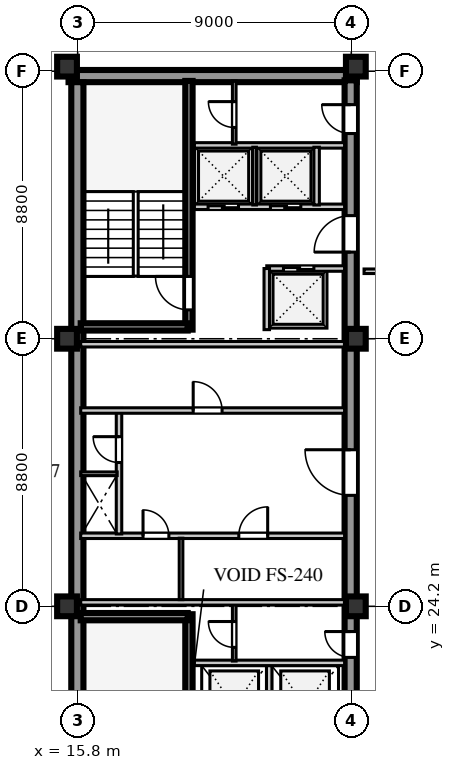
"""IFC4 building model, lengths in metres.
Left out: names, types, materials, properties, quantities, classifications, styles, units other than length and angle.
Written with IfcOpenShell. Run it as: python <this file> out.ifc"""

import sys

from ifc_helpers import new_model, si_unit, direction, frame, frame_2d, origin, origin_2d, place, context, subcontext, project, spatial, rectangle, extrude, element, fill, save


model = new_model("IFC4")
c1 = context("Model", 3, precision=1e-05, world=origin(), true_north=direction((0.0, 1.0)))
c2 = subcontext(c1, "Body", "Model", "MODEL_VIEW")
j1 = project(units=[si_unit("LENGTHUNIT", "METRE"), si_unit("PLANEANGLEUNIT", "RADIAN")], contexts=[c1])
p1 = place(None, origin())
s1 = spatial("IfcSite", under=j1, at=p1, CompositionType="ELEMENT")
p2 = place(p1, origin())
s2 = spatial("IfcBuilding", under=s1, at=p2, CompositionType="ELEMENT")
p3 = place(p2, frame((0.0, 0.0, 312.5)))
s3 = spatial("IfcBuildingStorey", under=s2, at=p3, CompositionType="ELEMENT", Elevation=312.5)
p4 = place(p3, frame((15.5, 41.64, 0.0), z_axis=(0.0, 0.0, 1.0), x_axis=(1.0, 0.0, 0.0)))
e1 = element("IfcWall", 1, at=p4, inside=s3, PredefinedType="SHEAR", context=c2, shape_type="SweptSolid", body=[
    extrude(rectangle(XDim=9.48, YDim=0.4, at=frame_2d((4.74, 0.0))), origin(), (0.0, 0.0, 1.0), 3.56),
])
p5 = place(p3, frame((15.79, 15.81, 0.0), z_axis=(0.0, 0.0, 1.0), x_axis=(0.0, 1.0, 0.0)))
e2 = element("IfcWall", 2, at=p5, inside=s3, PredefinedType="SHEAR", context=c2, shape_type="SweptSolid", body=[
    extrude(rectangle(XDim=25.63, YDim=0.4, at=frame_2d((12.815, 0.0))), origin(), (0.0, 0.0, 1.0), 3.56),
])
p6 = place(p3, frame((24.78, 15.74, 0.0), z_axis=(0.0, 0.0, 1.0), x_axis=(0.0, 1.0, 0.0)))
e3 = element("IfcWall", 3, at=p6, inside=s3, PredefinedType="SHEAR", context=c2, shape_type="SweptSolid", body=[
    extrude(rectangle(XDim=25.76, YDim=0.4, at=frame_2d((12.88, 0.0))), origin(), (0.0, 0.0, 1.0), 3.56),
])
p7 = place(p6, frame((1.61, 0.0, 0.0)))
e4 = element("IfcOpeningElement", 4, at=p7, cuts=e3, PredefinedType="OPENING", context=c2, shape_type="SweptSolid", body=[
    extrude(rectangle(XDim=1.2, YDim=2.1, at=frame_2d((0.6, 1.05))), frame((0.0, 0.21, 0.0), z_axis=(0.0, -1.0, 0.0), x_axis=(1.0, 0.0, 0.0)), (0.0, 0.0, 1.0), 0.42),
])
p8 = place(p6, frame((6.78, 0.0, 0.0)))
e5 = element("IfcOpeningElement", 5, at=p8, cuts=e3, PredefinedType="OPENING", context=c2, shape_type="SweptSolid", body=[
    extrude(rectangle(XDim=0.85, YDim=2.06, at=frame_2d((0.425, 1.03))), frame((0.0, 0.21, 0.0), z_axis=(0.0, -1.0, 0.0), x_axis=(1.0, 0.0, 0.0)), (0.0, 0.0, 1.0), 0.42),
])
p9 = place(p6, frame((12.11, 0.0, 0.0)))
e6 = element("IfcOpeningElement", 6, at=p9, cuts=e3, PredefinedType="OPENING", context=c2, shape_type="SweptSolid", body=[
    extrude(rectangle(XDim=1.5, YDim=2.12, at=frame_2d((0.75, 1.06))), frame((0.0, 0.21, 0.0), z_axis=(0.0, -1.0, 0.0), x_axis=(1.0, 0.0, 0.0)), (0.0, 0.0, 1.0), 0.42),
])
p10 = place(p6, frame((20.11, 0.0, 0.0)))
e7 = element("IfcOpeningElement", 7, at=p10, cuts=e3, PredefinedType="OPENING", context=c2, shape_type="SweptSolid", body=[
    extrude(rectangle(XDim=1.2, YDim=2.12, at=frame_2d((0.6, 1.06))), frame((0.0, 0.21, 0.0), z_axis=(0.0, -1.0, 0.0), x_axis=(1.0, 0.0, 0.0)), (0.0, 0.0, 1.0), 0.42),
])
p11 = place(p6, frame((24.01, 0.0, 0.0)))
e8 = element("IfcOpeningElement", 8, at=p11, cuts=e3, PredefinedType="OPENING", context=c2, shape_type="SweptSolid", body=[
    extrude(rectangle(XDim=0.95, YDim=2.1, at=frame_2d((0.475, 1.05))), frame((0.0, 0.21, 0.0), z_axis=(0.0, -1.0, 0.0), x_axis=(1.0, 0.0, 0.0)), (0.0, 0.0, 1.0), 0.42),
])
for number, where, z_axis, x_axis in (
    (9, (15.45, 24.2, 0.0), (0.0, 0.0, 1.0), (1.0, 0.0, 0.0)),
    (10, (15.45, 33.0, 0.0), (0.0, 0.0, 1.0), (1.0, 0.0, 0.0)),
    (11, (15.45, 41.95, 0.0), (0.0, 0.0, 1.0), (1.0, 0.0, 0.0)),
    (12, (24.95, 24.2, 0.0), (0.0, 0.0, 1.0), (1.0, 0.0, 0.0)),
    (13, (24.95, 33.0, 0.0), (0.0, 0.0, 1.0), (1.0, 0.0, 0.0)),
    (14, (24.95, 41.95, 0.0), (0.0, 0.0, 1.0), (1.0, 0.0, 0.0)),
):
    element("IfcColumn", number, at=place(p3, frame(where, z_axis=z_axis, x_axis=x_axis)), inside=s3, PredefinedType="COLUMN", context=c2, shape_type="SweptSolid", body=[
        extrude(rectangle(XDim=0.65, YDim=0.65, at=origin_2d()), origin(), (0.0, 0.0, 1.0), 3.56),
    ])
p12 = place(p3, frame((19.46, 15.74, 0.0), z_axis=(0.0, 0.0, 1.0), x_axis=(0.0, 1.0, 0.0)))
e15 = element("IfcWall", 15, at=p12, inside=s3, PredefinedType="SHEAR", context=c2, shape_type="SweptSolid", body=[
    extrude(rectangle(XDim=8.2, YDim=0.24, at=frame_2d((4.1, 0.0))), origin(), (0.0, 0.0, 1.0), 3.8),
])
p13 = place(p12, frame((0.45, 0.0, 0.0)))
e16 = element("IfcOpeningElement", 16, at=p13, cuts=e15, PredefinedType="OPENING", context=c2, shape_type="SweptSolid", body=[
    extrude(rectangle(XDim=1.1, YDim=2.1, at=frame_2d((0.55, 1.05))), frame((0.0, 0.13, 0.0), z_axis=(0.0, -1.0, 0.0), x_axis=(1.0, 0.0, 0.0)), (0.0, 0.0, 1.0), 0.26),
])
p14 = place(p3, frame((15.9, 23.86, 0.0), z_axis=(0.0, 0.0, 1.0), x_axis=(1.0, 0.0, 0.0)))
e17 = element("IfcWall", 17, at=p14, inside=s3, PredefinedType="SHEAR", context=c2, shape_type="SweptSolid", body=[
    extrude(rectangle(XDim=3.52, YDim=0.24, at=frame_2d((1.76, 0.0))), origin(), (0.0, 0.0, 1.0), 3.8),
])
p15 = place(p3, frame((22.1, 19.51, 0.0), z_axis=(0.0, 0.0, 1.0), x_axis=(0.0, 1.0, 0.0)))
e18 = element("IfcWall", 18, at=p15, inside=s3, PredefinedType="SOLIDWALL", context=c2, shape_type="SweptSolid", body=[
    extrude(rectangle(XDim=2.74, YDim=0.18, at=frame_2d((1.37, 0.0))), origin(), (0.0, 0.0, 1.0), 3.56),
])
p16 = place(p3, frame((19.64, 22.34, 0.0), z_axis=(0.0, 0.0, 1.0), x_axis=(1.0, 0.0, 0.0)))
e19 = element("IfcWall", 19, at=p16, inside=s3, PredefinedType="SOLIDWALL", context=c2, shape_type="SweptSolid", body=[
    extrude(rectangle(XDim=4.94, YDim=0.18, at=frame_2d((2.47, 0.0))), origin(), (0.0, 0.0, 1.0), 3.56),
])
p17 = place(p3, frame((20.95, 22.4, 0.0), z_axis=(0.0, 0.0, 1.0), x_axis=(0.0, 1.0, 0.0)))
e20 = element("IfcWall", 20, at=p17, inside=s3, PredefinedType="PARTITIONING", context=c2, shape_type="SweptSolid", body=[
    extrude(rectangle(XDim=1.88, YDim=0.12, at=frame_2d((0.94, 0.0))), origin(), (0.0, 0.0, 1.0), 3.56),
])
p18 = place(p17, frame((0.45, 0.0, 0.0)))
e21 = element("IfcOpeningElement", 21, at=p18, cuts=e20, PredefinedType="OPENING", context=c2, shape_type="SweptSolid", body=[
    extrude(rectangle(XDim=0.85, YDim=2.06, at=frame_2d((0.425, 1.03))), frame((0.0, 0.07, 0.0), z_axis=(0.0, -1.0, 0.0), x_axis=(1.0, 0.0, 0.0)), (0.0, 0.0, 1.0), 0.14),
])
p19 = place(p3, frame((15.9, 26.52, 0.0), z_axis=(0.0, 0.0, 1.0), x_axis=(1.0, 0.0, 0.0)))
e22 = element("IfcWall", 22, at=p19, inside=s3, PredefinedType="SOLIDWALL", context=c2, shape_type="SweptSolid", body=[
    extrude(rectangle(XDim=8.68, YDim=0.18, at=frame_2d((4.34, 0.0))), origin(), (0.0, 0.0, 1.0), 3.56),
])
p20 = place(p19, frame((2.05, 0.0, 0.0)))
e23 = element("IfcOpeningElement", 23, at=p20, cuts=e22, PredefinedType="OPENING", context=c2, shape_type="SweptSolid", body=[
    extrude(rectangle(XDim=0.85, YDim=2.06, at=frame_2d((0.425, 1.03))), frame((0.0, 0.1, 0.0), z_axis=(0.0, -1.0, 0.0), x_axis=(1.0, 0.0, 0.0)), (0.0, 0.0, 1.0), 0.2),
])
p21 = place(p19, frame((5.2, 0.0, 0.0)))
e24 = element("IfcOpeningElement", 24, at=p21, cuts=e22, PredefinedType="OPENING", context=c2, shape_type="SweptSolid", body=[
    extrude(rectangle(XDim=0.95, YDim=2.1, at=frame_2d((0.475, 1.05))), frame((0.0, 0.1, 0.0), z_axis=(0.0, -1.0, 0.0), x_axis=(1.0, 0.0, 0.0)), (0.0, 0.0, 1.0), 0.2),
])
p22 = place(p3, frame((15.9, 24.33, 0.0), z_axis=(0.0, 0.0, 1.0), x_axis=(1.0, 0.0, 0.0)))
e25 = element("IfcWall", 25, at=p22, inside=s3, PredefinedType="SOLIDWALL", context=c2, shape_type="SweptSolid", body=[
    extrude(rectangle(XDim=8.68, YDim=0.18, at=frame_2d((4.34, 0.0))), origin(), (0.0, 0.0, 1.0), 2.96),
])
p23 = place(p3, frame((19.2, 24.42, 0.0), z_axis=(0.0, 0.0, 1.0), x_axis=(0.0, 1.0, 0.0)))
e26 = element("IfcWall", 26, at=p23, inside=s3, PredefinedType="PARTITIONING", context=c2, shape_type="SweptSolid", body=[
    extrude(rectangle(XDim=2.02, YDim=0.12, at=frame_2d((1.01, 0.0))), origin(), (0.0, 0.0, 1.0), 3.56),
])
p24 = place(p3, frame((17.16, 26.58, 0.0), z_axis=(0.0, 0.0, 1.0), x_axis=(0.0, 1.0, 0.0)))
e27 = element("IfcWall", 27, at=p24, inside=s3, PredefinedType="SOLIDWALL", context=c2, shape_type="SweptSolid", body=[
    extrude(rectangle(XDim=4.02, YDim=0.18, at=frame_2d((2.01, 0.0))), origin(), (0.0, 0.0, 1.0), 3.56),
])
p25 = place(p24, frame((2.35, 0.0, 0.0)))
e28 = element("IfcOpeningElement", 28, at=p25, cuts=e27, PredefinedType="OPENING", context=c2, shape_type="SweptSolid", body=[
    extrude(rectangle(XDim=0.85, YDim=2.06, at=frame_2d((0.425, 1.03))), frame((0.0, 0.1, 0.0), z_axis=(0.0, -1.0, 0.0), x_axis=(1.0, 0.0, 0.0)), (0.0, 0.0, 1.0), 0.2),
])
p26 = place(p3, frame((15.9, 28.56, 0.0), z_axis=(0.0, 0.0, 1.0), x_axis=(1.0, 0.0, 0.0)))
e29 = element("IfcWall", 29, at=p26, inside=s3, PredefinedType="PARTITIONING", context=c2, shape_type="SweptSolid", body=[
    extrude(rectangle(XDim=1.2, YDim=0.12, at=frame_2d((0.6, 0.0))), origin(), (0.0, 0.0, 1.0), 3.56),
])
p27 = place(p3, frame((15.9, 30.64, 0.0), z_axis=(0.0, 0.0, 1.0), x_axis=(1.0, 0.0, 0.0)))
e30 = element("IfcWall", 30, at=p27, inside=s3, PredefinedType="SOLIDWALL", context=c2, shape_type="SweptSolid", body=[
    extrude(rectangle(XDim=8.68, YDim=0.18, at=frame_2d((4.34, 0.0))), origin(), (0.0, 0.0, 1.0), 3.56),
])
p28 = place(p27, frame((3.7, 0.0, 0.0)))
e31 = element("IfcOpeningElement", 31, at=p28, cuts=e30, PredefinedType="OPENING", context=c2, shape_type="SweptSolid", body=[
    extrude(rectangle(XDim=0.95, YDim=2.1, at=frame_2d((0.475, 1.05))), frame((0.0, 0.1, 0.0), z_axis=(0.0, -1.0, 0.0), x_axis=(1.0, 0.0, 0.0)), (0.0, 0.0, 1.0), 0.2),
])
p29 = place(p3, frame((15.9, 32.82, 0.0), z_axis=(0.0, 0.0, 1.0), x_axis=(1.0, 0.0, 0.0)))
e32 = element("IfcWall", 32, at=p29, inside=s3, PredefinedType="SOLIDWALL", context=c2, shape_type="SweptSolid", body=[
    extrude(rectangle(XDim=8.68, YDim=0.18, at=frame_2d((4.34, 0.0))), origin(), (0.0, 0.0, 1.0), 2.96),
])
p30 = place(p3, frame((19.46, 33.3, 0.0), z_axis=(0.0, 0.0, 1.0), x_axis=(0.0, 1.0, 0.0)))
e33 = element("IfcWall", 33, at=p30, inside=s3, PredefinedType="SHEAR", context=c2, shape_type="SweptSolid", body=[
    extrude(rectangle(XDim=8.18, YDim=0.24, at=frame_2d((4.09, 0.0))), origin(), (0.0, 0.0, 1.0), 3.8),
])
p31 = place(p30, frame((0.65, 0.0, 0.0)))
e34 = element("IfcOpeningElement", 34, at=p31, cuts=e33, PredefinedType="OPENING", context=c2, shape_type="SweptSolid", body=[
    extrude(rectangle(XDim=1.1, YDim=2.1, at=frame_2d((0.55, 1.05))), frame((0.0, 0.13, 0.0), z_axis=(0.0, -1.0, 0.0), x_axis=(1.0, 0.0, 0.0)), (0.0, 0.0, 1.0), 0.26),
])
p32 = place(p3, frame((15.9, 33.39, 0.0), z_axis=(0.0, 0.0, 1.0), x_axis=(1.0, 0.0, 0.0)))
e35 = element("IfcWall", 35, at=p32, inside=s3, PredefinedType="SHEAR", context=c2, shape_type="SweptSolid", body=[
    extrude(rectangle(XDim=3.52, YDim=0.24, at=frame_2d((1.76, 0.0))), origin(), (0.0, 0.0, 1.0), 3.8),
])
p33 = place(p3, frame((22.02, 35.31, 0.0), z_axis=(0.0, 0.0, 1.0), x_axis=(1.0, 0.0, 0.0)))
e36 = element("IfcWall", 36, at=p33, inside=s3, PredefinedType="SOLIDWALL", context=c2, shape_type="SweptSolid", body=[
    extrude(rectangle(XDim=2.56, YDim=0.18, at=frame_2d((1.28, 0.0))), origin(), (0.0, 0.0, 1.0), 3.56),
])
p34 = place(p33, frame((0.55, 0.0, 0.0)))
e37 = element("IfcOpeningElement", 37, at=p34, cuts=e36, PredefinedType="OPENING", context=c2, shape_type="SweptSolid", body=[
    extrude(rectangle(XDim=1.0, YDim=2.1, at=frame_2d((0.5, 1.05))), frame((0.0, 0.1, 0.0), z_axis=(0.0, -1.0, 0.0), x_axis=(1.0, 0.0, 0.0)), (0.0, 0.0, 1.0), 0.2),
])
p35 = place(p3, frame((22.02, 33.3, 0.0), z_axis=(0.0, 0.0, 1.0), x_axis=(0.0, 1.0, 0.0)))
e38 = element("IfcWall", 38, at=p35, inside=s3, PredefinedType="SOLIDWALL", context=c2, shape_type="SweptSolid", body=[
    extrude(rectangle(XDim=2.01, YDim=0.18, at=frame_2d((1.005, 0.0))), origin(), (0.0, 0.0, 1.0), 3.56),
])
p36 = place(p3, frame((19.64, 37.34, 0.0), z_axis=(0.0, 0.0, 1.0), x_axis=(1.0, 0.0, 0.0)))
e39 = element("IfcWall", 39, at=p36, inside=s3, PredefinedType="SOLIDWALL", context=c2, shape_type="SweptSolid", body=[
    extrude(rectangle(XDim=4.94, YDim=0.18, at=frame_2d((2.47, 0.0))), origin(), (0.0, 0.0, 1.0), 3.56),
])
p37 = place(p36, frame((0.45, 0.0, 0.0)))
e40 = element("IfcOpeningElement", 40, at=p37, cuts=e39, PredefinedType="OPENING", context=c2, shape_type="SweptSolid", body=[
    extrude(rectangle(XDim=1.0, YDim=2.1, at=frame_2d((0.5, 1.05))), frame((0.0, 0.1, 0.0), z_axis=(0.0, -1.0, 0.0), x_axis=(1.0, 0.0, 0.0)), (0.0, 0.0, 1.0), 0.2),
])
p38 = place(p36, frame((2.5, 0.0, 0.0)))
e41 = element("IfcOpeningElement", 41, at=p38, cuts=e39, PredefinedType="OPENING", context=c2, shape_type="SweptSolid", body=[
    extrude(rectangle(XDim=1.0, YDim=2.1, at=frame_2d((0.5, 1.05))), frame((0.0, 0.1, 0.0), z_axis=(0.0, -1.0, 0.0), x_axis=(1.0, 0.0, 0.0)), (0.0, 0.0, 1.0), 0.2),
])
p39 = place(p3, frame((19.64, 39.36, 0.0), z_axis=(0.0, 0.0, 1.0), x_axis=(1.0, 0.0, 0.0)))
e42 = element("IfcWall", 42, at=p39, inside=s3, PredefinedType="SOLIDWALL", context=c2, shape_type="SweptSolid", body=[
    extrude(rectangle(XDim=4.94, YDim=0.18, at=frame_2d((2.47, 0.0))), origin(), (0.0, 0.0, 1.0), 3.56),
])
p40 = place(p3, frame((21.62, 37.4, 0.0), z_axis=(0.0, 0.0, 1.0), x_axis=(0.0, 1.0, 0.0)))
e43 = element("IfcWall", 43, at=p40, inside=s3, PredefinedType="PARTITIONING", context=c2, shape_type="SweptSolid", body=[
    extrude(rectangle(XDim=1.9, YDim=0.12, at=frame_2d((0.95, 0.0))), origin(), (0.0, 0.0, 1.0), 3.56),
])
p41 = place(p3, frame((23.66, 37.4, 0.0), z_axis=(0.0, 0.0, 1.0), x_axis=(0.0, 1.0, 0.0)))
e44 = element("IfcWall", 44, at=p41, inside=s3, PredefinedType="SOLIDWALL", context=c2, shape_type="SweptSolid", body=[
    extrude(rectangle(XDim=1.9, YDim=0.18, at=frame_2d((0.95, 0.0))), origin(), (0.0, 0.0, 1.0), 3.56),
])
p42 = place(p3, frame((20.95, 39.4, 0.0), z_axis=(0.0, 0.0, 1.0), x_axis=(0.0, 1.0, 0.0)))
e45 = element("IfcWall", 45, at=p42, inside=s3, PredefinedType="PARTITIONING", context=c2, shape_type="SweptSolid", body=[
    extrude(rectangle(XDim=2.08, YDim=0.12, at=frame_2d((1.04, 0.0))), origin(), (0.0, 0.0, 1.0), 3.56),
])
p43 = place(p42, frame((0.55, 0.0, 0.0)))
e46 = element("IfcOpeningElement", 46, at=p43, cuts=e45, PredefinedType="OPENING", context=c2, shape_type="SweptSolid", body=[
    extrude(rectangle(XDim=0.85, YDim=2.06, at=frame_2d((0.425, 1.03))), frame((0.0, 0.07, 0.0), z_axis=(0.0, -1.0, 0.0), x_axis=(1.0, 0.0, 0.0)), (0.0, 0.0, 1.0), 0.14),
])
p44 = place(p3, frame((25.22, 35.22, 0.0), z_axis=(0.0, 0.0, 1.0), x_axis=(1.0, 0.0, 0.0)))
e47 = element("IfcWall", 47, at=p44, inside=s3, PredefinedType="PARTITIONING", context=c2, shape_type="SweptSolid", body=[
    extrude(rectangle(XDim=9.5, YDim=0.15, at=frame_2d((4.75, 0.0))), origin(), (0.0, 0.0, 1.0), 3.56),
])
p45 = place(p44, frame((1.8, 0.0, 0.0)))
e48 = element("IfcOpeningElement", 48, at=p45, cuts=e47, PredefinedType="OPENING", context=c2, shape_type="SweptSolid", body=[
    extrude(rectangle(XDim=1.1, YDim=2.08, at=frame_2d((0.55, 1.04))), frame((0.0, 0.085, 0.0), z_axis=(0.0, -1.0, 0.0), x_axis=(1.0, 0.0, 0.0)), (0.0, 0.0, 1.0), 0.17),
])
p46 = place(p18, origin())
e49 = element("IfcDoor", 49, at=p46, inside=s3, OperationType="SINGLE_SWING_RIGHT", PredefinedType="DOOR", context=c2, shape_type="SweptSolid", body=[
    extrude(rectangle(XDim=0.85, YDim=2.06, at=frame_2d((0.425, 1.03))), frame((0.0, 0.025, 0.0), z_axis=(0.0, -1.0, 0.0), x_axis=(1.0, 0.0, 0.0)), (0.0, 0.0, 1.0), 0.05),
])
fill(e21, e49)
p47 = place(p8, frame((0.85, 0.0, 0.0), z_axis=(0.0, 0.0, 1.0), x_axis=(-1.0, 0.0, 0.0)))
e50 = element("IfcDoor", 50, at=p47, inside=s3, OperationType="SINGLE_SWING_LEFT", PredefinedType="DOOR", context=c2, shape_type="SweptSolid", body=[
    extrude(rectangle(XDim=0.85, YDim=2.06, at=frame_2d((0.425, 1.03))), frame((0.0, 0.025, 0.0), z_axis=(0.0, -1.0, 0.0), x_axis=(1.0, 0.0, 0.0)), (0.0, 0.0, 1.0), 0.05),
])
fill(e5, e50)
p48 = place(p20, origin())
e51 = element("IfcDoor", 51, at=p48, inside=s3, OperationType="SINGLE_SWING_LEFT", PredefinedType="DOOR", context=c2, shape_type="SweptSolid", body=[
    extrude(rectangle(XDim=0.85, YDim=2.06, at=frame_2d((0.425, 1.03))), frame((0.0, 0.025, 0.0), z_axis=(0.0, -1.0, 0.0), x_axis=(1.0, 0.0, 0.0)), (0.0, 0.0, 1.0), 0.05),
])
fill(e23, e51)
p49 = place(p21, origin())
e52 = element("IfcDoor", 52, at=p49, inside=s3, OperationType="SINGLE_SWING_RIGHT", PredefinedType="DOOR", context=c2, shape_type="SweptSolid", body=[
    extrude(rectangle(XDim=0.95, YDim=2.1, at=frame_2d((0.475, 1.05))), frame((0.0, 0.025, 0.0), z_axis=(0.0, -1.0, 0.0), x_axis=(1.0, 0.0, 0.0)), (0.0, 0.0, 1.0), 0.05),
])
fill(e24, e52)
p50 = place(p25, origin())
e53 = element("IfcDoor", 53, at=p50, inside=s3, OperationType="SINGLE_SWING_RIGHT", PredefinedType="DOOR", context=c2, shape_type="SweptSolid", body=[
    extrude(rectangle(XDim=0.85, YDim=2.06, at=frame_2d((0.425, 1.03))), frame((0.0, 0.025, 0.0), z_axis=(0.0, -1.0, 0.0), x_axis=(1.0, 0.0, 0.0)), (0.0, 0.0, 1.0), 0.05),
])
fill(e28, e53)
p51 = place(p9, frame((1.5, 0.0, 0.0), z_axis=(0.0, 0.0, 1.0), x_axis=(-1.0, 0.0, 0.0)))
e54 = element("IfcDoor", 54, at=p51, inside=s3, OperationType="SINGLE_SWING_LEFT", PredefinedType="DOOR", context=c2, shape_type="SweptSolid", body=[
    extrude(rectangle(XDim=1.5, YDim=2.12, at=frame_2d((0.75, 1.06))), frame((0.0, 0.025, 0.0), z_axis=(0.0, -1.0, 0.0), x_axis=(1.0, 0.0, 0.0)), (0.0, 0.0, 1.0), 0.05),
])
fill(e6, e54)
p52 = place(p28, frame((0.95, 0.0, 0.0), z_axis=(0.0, 0.0, 1.0), x_axis=(-1.0, 0.0, 0.0)))
e55 = element("IfcDoor", 55, at=p52, inside=s3, OperationType="SINGLE_SWING_RIGHT", PredefinedType="DOOR", context=c2, shape_type="SweptSolid", body=[
    extrude(rectangle(XDim=0.95, YDim=2.1, at=frame_2d((0.475, 1.05))), frame((0.0, 0.025, 0.0), z_axis=(0.0, -1.0, 0.0), x_axis=(1.0, 0.0, 0.0)), (0.0, 0.0, 1.0), 0.05),
])
fill(e31, e55)
p53 = place(p31, origin())
e56 = element("IfcDoor", 56, at=p53, inside=s3, OperationType="SINGLE_SWING_RIGHT", PredefinedType="DOOR", context=c2, shape_type="SweptSolid", body=[
    extrude(rectangle(XDim=1.1, YDim=2.1, at=frame_2d((0.55, 1.05))), frame((0.0, 0.025, 0.0), z_axis=(0.0, -1.0, 0.0), x_axis=(1.0, 0.0, 0.0)), (0.0, 0.0, 1.0), 0.05),
])
fill(e34, e56)
p54 = place(p10, frame((1.2, 0.0, 0.0), z_axis=(0.0, 0.0, 1.0), x_axis=(-1.0, 0.0, 0.0)))
e57 = element("IfcDoor", 57, at=p54, inside=s3, OperationType="SINGLE_SWING_RIGHT", PredefinedType="DOOR", context=c2, shape_type="SweptSolid", body=[
    extrude(rectangle(XDim=1.2, YDim=2.12, at=frame_2d((0.6, 1.06))), frame((0.0, 0.025, 0.0), z_axis=(0.0, -1.0, 0.0), x_axis=(1.0, 0.0, 0.0)), (0.0, 0.0, 1.0), 0.05),
])
fill(e7, e57)
p55 = place(p37, frame((1.0, 0.0, 0.0), z_axis=(0.0, 0.0, 1.0), x_axis=(-1.0, 0.0, 0.0)))
e58 = element("IfcDoor", 58, at=p55, inside=s3, OperationType="DOUBLE_DOOR_SLIDING", PredefinedType="DOOR", context=c2, shape_type="SweptSolid", body=[
    extrude(rectangle(XDim=1.0, YDim=2.1, at=frame_2d((0.5, 1.05))), frame((0.0, 0.025, 0.0), z_axis=(0.0, -1.0, 0.0), x_axis=(1.0, 0.0, 0.0)), (0.0, 0.0, 1.0), 0.05),
])
fill(e40, e58)
p56 = place(p38, frame((1.0, 0.0, 0.0), z_axis=(0.0, 0.0, 1.0), x_axis=(-1.0, 0.0, 0.0)))
e59 = element("IfcDoor", 59, at=p56, inside=s3, OperationType="DOUBLE_DOOR_SLIDING", PredefinedType="DOOR", context=c2, shape_type="SweptSolid", body=[
    extrude(rectangle(XDim=1.0, YDim=2.1, at=frame_2d((0.5, 1.05))), frame((0.0, 0.025, 0.0), z_axis=(0.0, -1.0, 0.0), x_axis=(1.0, 0.0, 0.0)), (0.0, 0.0, 1.0), 0.05),
])
fill(e41, e59)
p57 = place(p34, origin())
e60 = element("IfcDoor", 60, at=p57, inside=s3, OperationType="DOUBLE_DOOR_SLIDING", PredefinedType="DOOR", context=c2, shape_type="SweptSolid", body=[
    extrude(rectangle(XDim=1.0, YDim=2.1, at=frame_2d((0.5, 1.05))), frame((0.0, 0.025, 0.0), z_axis=(0.0, -1.0, 0.0), x_axis=(1.0, 0.0, 0.0)), (0.0, 0.0, 1.0), 0.05),
])
fill(e37, e60)
p58 = place(p43, origin())
e61 = element("IfcDoor", 61, at=p58, inside=s3, OperationType="SINGLE_SWING_RIGHT", PredefinedType="DOOR", context=c2, shape_type="SweptSolid", body=[
    extrude(rectangle(XDim=0.85, YDim=2.06, at=frame_2d((0.425, 1.03))), frame((0.0, 0.025, 0.0), z_axis=(0.0, -1.0, 0.0), x_axis=(1.0, 0.0, 0.0)), (0.0, 0.0, 1.0), 0.05),
])
fill(e46, e61)
p59 = place(p11, frame((0.95, 0.0, 0.0), z_axis=(0.0, 0.0, 1.0), x_axis=(-1.0, 0.0, 0.0)))
e62 = element("IfcDoor", 62, at=p59, inside=s3, OperationType="SINGLE_SWING_LEFT", PredefinedType="DOOR", context=c2, shape_type="SweptSolid", body=[
    extrude(rectangle(XDim=0.95, YDim=2.1, at=frame_2d((0.475, 1.05))), frame((0.0, 0.025, 0.0), z_axis=(0.0, -1.0, 0.0), x_axis=(1.0, 0.0, 0.0)), (0.0, 0.0, 1.0), 0.05),
])
fill(e8, e62)
save(model, sys.argv[1])
